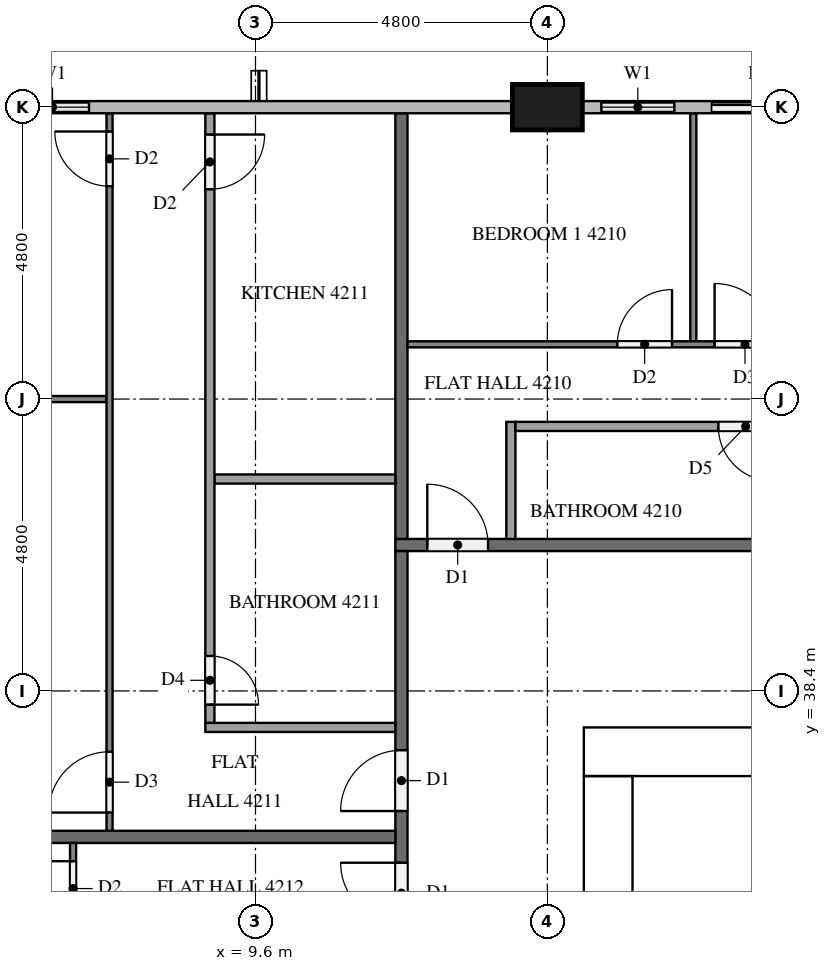
"""IFC4 building model, lengths in metres.
Left out: names, types, materials, properties, quantities, classifications, styles, units other than length and angle.
Written with IfcOpenShell. Run it as: python <this file> out.ifc"""

import sys

from ifc_helpers import new_model, si_unit, direction, frame, frame_2d, origin, origin_2d, place, context, subcontext, project, spatial, rectangle, extrude, element, fill, save


model = new_model("IFC4")
c1 = context("Model", 3, precision=1e-05, world=origin(), true_north=direction((0.0, 1.0)))
c2 = subcontext(c1, "Body", "Model", "MODEL_VIEW")
j1 = project(units=[si_unit("LENGTHUNIT", "METRE"), si_unit("PLANEANGLEUNIT", "RADIAN")], contexts=[c1])
p1 = place(None, origin())
s1 = spatial("IfcSite", under=j1, at=p1, CompositionType="ELEMENT")
p2 = place(p1, origin())
s2 = spatial("IfcBuilding", under=s1, at=p2, CompositionType="ELEMENT")
p3 = place(p2, frame((0.0, 0.0, 163.0)))
s3 = spatial("IfcBuildingStorey", under=s2, at=p3, CompositionType="ELEMENT", Elevation=163.0)
p4 = place(p3, frame((15.0, 37.4, 0.0), z_axis=(0.0, 0.0, 1.0), x_axis=(1.0, 0.0, 0.0)))
e1 = element("IfcWall", 1, at=p4, inside=s3, PredefinedType="SHEAR", context=c2, shape_type="SweptSolid", body=[
    extrude(rectangle(XDim=32.4, YDim=0.8, at=frame_2d((16.2, 0.0))), origin(), (0.0, 0.0, 1.0), 3.2),
])
p5 = place(p4, frame((15.3, 0.0, 0.0)))
e2 = element("IfcOpeningElement", 2, at=p5, cuts=e1, PredefinedType="OPENING", context=c2, shape_type="SweptSolid", body=[
    extrude(rectangle(XDim=1.8, YDim=2.1, at=frame_2d((0.9, 1.05))), frame((0.0, 0.41, 0.0), z_axis=(0.0, -1.0, 0.0), x_axis=(1.0, 0.0, 0.0)), (0.0, 0.0, 1.0), 0.82),
])
p6 = place(p4, frame((1.51, 0.0, 0.0)))
e3 = element("IfcOpeningElement", 3, at=p6, cuts=e1, PredefinedType="OPENING", context=c2, shape_type="SweptSolid", body=[
    extrude(rectangle(XDim=1.0, YDim=2.1, at=frame_2d((0.5, 1.05))), frame((0.0, 0.41, 0.0), z_axis=(0.0, -1.0, 0.0), x_axis=(1.0, 0.0, 0.0)), (0.0, 0.0, 1.0), 0.82),
])
p7 = place(p4, frame((5.11, 0.0, 0.0)))
e4 = element("IfcOpeningElement", 4, at=p7, cuts=e1, PredefinedType="OPENING", context=c2, shape_type="SweptSolid", body=[
    extrude(rectangle(XDim=1.0, YDim=2.1, at=frame_2d((0.5, 1.05))), frame((0.0, 0.41, 0.0), z_axis=(0.0, -1.0, 0.0), x_axis=(1.0, 0.0, 0.0)), (0.0, 0.0, 1.0), 0.82),
])
p8 = place(p3, frame((15.4, 15.8, 0.0), z_axis=(0.0, 0.0, 1.0), x_axis=(0.0, 1.0, 0.0)))
e5 = element("IfcWall", 5, at=p8, inside=s3, PredefinedType="SHEAR", context=c2, shape_type="SweptSolid", body=[
    extrude(rectangle(XDim=21.2, YDim=0.8, at=frame_2d((10.6, 0.0))), origin(), (0.0, 0.0, 1.0), 3.2),
])
p9 = place(p8, frame((4.96, 0.0, 0.0)))
e6 = element("IfcOpeningElement", 6, at=p9, cuts=e5, PredefinedType="OPENING", context=c2, shape_type="SweptSolid", body=[
    extrude(rectangle(XDim=1.2, YDim=2.1, at=frame_2d((0.6, 1.05))), frame((0.0, 0.41, 0.0), z_axis=(0.0, -1.0, 0.0), x_axis=(1.0, 0.0, 0.0)), (0.0, 0.0, 1.0), 0.82),
])
p10 = place(p3, frame((14.4, 48.0, 0.0), z_axis=(0.0, 0.0, 1.0), x_axis=(1.0, 0.0, 0.0)))
e7 = element("IfcColumn", 7, at=p10, inside=s3, PredefinedType="COLUMN", context=c2, shape_type="SweptSolid", body=[
    extrude(rectangle(XDim=1.15, YDim=0.75, at=origin_2d()), origin(), (0.0, 0.0, 1.0), 3.2),
])
p11 = place(p3, frame((19.2, 48.0, 0.0), z_axis=(0.0, 0.0, 1.0), x_axis=(-1.0, 0.0, 0.0)))
e8 = element("IfcWall", 8, at=p11, inside=s3, PredefinedType="SOLIDWALL", context=c2, shape_type="SweptSolid", body=[
    extrude(rectangle(XDim=4.225, YDim=0.15, at=frame_2d((2.112, 0.0))), origin(), (0.0, 0.0, 1.0), 3.2),
])
p12 = place(p11, frame((0.3, 0.0, 0.0)))
e9 = element("IfcOpeningElement", 9, at=p12, cuts=e8, PredefinedType="OPENING", context=c2, shape_type="SweptSolid", body=[
    extrude(rectangle(XDim=1.8, YDim=2.4, at=frame_2d((0.9, 1.2))), frame((0.0, 0.085, 0.0), z_axis=(0.0, -1.0, 0.0), x_axis=(1.0, 0.0, 0.0)), (0.0, 0.0, 1.0), 0.17),
])
p13 = place(p11, frame((2.712, 0.0, 0.9)))
e10 = element("IfcOpeningElement", 10, at=p13, cuts=e8, PredefinedType="OPENING", context=c2, shape_type="SweptSolid", body=[
    extrude(rectangle(XDim=1.2, YDim=1.4, at=frame_2d((0.6, 0.7))), frame((0.0, 0.085, 0.0), z_axis=(0.0, -1.0, 0.0), x_axis=(1.0, 0.0, 0.0)), (0.0, 0.0, 1.0), 0.17),
])
p14 = place(p3, frame((7.2, 48.0, 0.0), z_axis=(0.0, 0.0, 1.0), x_axis=(-1.0, 0.0, 0.0)))
e11 = element("IfcWall", 11, at=p14, inside=s3, PredefinedType="SOLIDWALL", context=c2, shape_type="SweptSolid", body=[
    extrude(rectangle(XDim=1.875, YDim=0.15, at=frame_2d((0.938, 0.0))), origin(), (0.0, 0.0, 1.0), 3.2),
])
p15 = place(p14, frame((0.337, 0.0, 0.9)))
e12 = element("IfcOpeningElement", 12, at=p15, cuts=e11, PredefinedType="OPENING", context=c2, shape_type="SweptSolid", body=[
    extrude(rectangle(XDim=1.2, YDim=1.4, at=frame_2d((0.6, 0.7))), frame((0.0, 0.085, 0.0), z_axis=(0.0, -1.0, 0.0), x_axis=(1.0, 0.0, 0.0)), (0.0, 0.0, 1.0), 0.17),
])
p16 = place(p3, frame((11.9, 40.8, 0.0), z_axis=(0.0, 0.0, 1.0), x_axis=(1.0, 0.0, 0.0)))
e13 = element("IfcWall", 13, at=p16, inside=s3, PredefinedType="PARTITIONING", context=c2, shape_type="SweptSolid", body=[
    extrude(rectangle(XDim=38.6, YDim=0.2, at=frame_2d((19.3, 0.0))), origin(), (0.0, 0.0, 1.0), 3.2),
])
p17 = place(p16, frame((31.725, 0.0, 0.0)))
e14 = element("IfcOpeningElement", 14, at=p17, cuts=e13, PredefinedType="OPENING", context=c2, shape_type="SweptSolid", body=[
    extrude(rectangle(XDim=1.0, YDim=2.1, at=frame_2d((0.5, 1.05))), frame((0.0, 0.11, 0.0), z_axis=(0.0, -1.0, 0.0), x_axis=(1.0, 0.0, 0.0)), (0.0, 0.0, 1.0), 0.22),
])
p18 = place(p16, frame((17.325, 0.0, 0.0)))
e15 = element("IfcOpeningElement", 15, at=p18, cuts=e13, PredefinedType="OPENING", context=c2, shape_type="SweptSolid", body=[
    extrude(rectangle(XDim=1.0, YDim=2.1, at=frame_2d((0.5, 1.05))), frame((0.0, 0.11, 0.0), z_axis=(0.0, -1.0, 0.0), x_axis=(1.0, 0.0, 0.0)), (0.0, 0.0, 1.0), 0.22),
])
p19 = place(p16, frame((0.525, 0.0, 0.0)))
e16 = element("IfcOpeningElement", 16, at=p19, cuts=e13, PredefinedType="OPENING", context=c2, shape_type="SweptSolid", body=[
    extrude(rectangle(XDim=1.0, YDim=2.1, at=frame_2d((0.5, 1.05))), frame((0.0, 0.11, 0.0), z_axis=(0.0, -1.0, 0.0), x_axis=(1.0, 0.0, 0.0)), (0.0, 0.0, 1.0), 0.22),
])
p20 = place(p3, frame((12.0, 12.1, 0.0), z_axis=(0.0, 0.0, 1.0), x_axis=(0.0, 1.0, 0.0)))
e17 = element("IfcWall", 17, at=p20, inside=s3, PredefinedType="PARTITIONING", context=c2, shape_type="SweptSolid", body=[
    extrude(rectangle(XDim=28.6, YDim=0.2, at=frame_2d((14.3, 0.0))), origin(), (0.0, 0.0, 1.0), 3.2),
])
p21 = place(p20, frame((24.325, 0.0, 0.0)))
e18 = element("IfcOpeningElement", 18, at=p21, cuts=e17, PredefinedType="OPENING", context=c2, shape_type="SweptSolid", body=[
    extrude(rectangle(XDim=1.0, YDim=2.1, at=frame_2d((0.5, 1.05))), frame((0.0, 0.11, 0.0), z_axis=(0.0, -1.0, 0.0), x_axis=(1.0, 0.0, 0.0)), (0.0, 0.0, 1.0), 0.22),
])
p22 = place(p20, frame((22.475, 0.0, 0.0)))
e19 = element("IfcOpeningElement", 19, at=p22, cuts=e17, PredefinedType="OPENING", context=c2, shape_type="SweptSolid", body=[
    extrude(rectangle(XDim=1.0, YDim=2.1, at=frame_2d((0.5, 1.05))), frame((0.0, 0.11, 0.0), z_axis=(0.0, -1.0, 0.0), x_axis=(1.0, 0.0, 0.0)), (0.0, 0.0, 1.0), 0.22),
])
p23 = place(p20, frame((0.325, 0.0, 0.0)))
e20 = element("IfcOpeningElement", 20, at=p23, cuts=e17, PredefinedType="OPENING", context=c2, shape_type="SweptSolid", body=[
    extrude(rectangle(XDim=1.0, YDim=2.1, at=frame_2d((0.5, 1.05))), frame((0.0, 0.11, 0.0), z_axis=(0.0, -1.0, 0.0), x_axis=(1.0, 0.0, 0.0)), (0.0, 0.0, 1.0), 0.22),
])
p24 = place(p3, frame((12.0, 47.9, 0.0), z_axis=(0.0, 0.0, 1.0), x_axis=(0.0, -1.0, 0.0)))
e21 = element("IfcWall", 21, at=p24, inside=s3, PredefinedType="PARTITIONING", context=c2, shape_type="SweptSolid", body=[
    extrude(rectangle(XDim=7.0, YDim=0.2, at=frame_2d((3.5, 0.0))), origin(), (0.0, 0.0, 1.0), 3.2),
])
p25 = place(p3, frame((0.1, 36.0, 0.0), z_axis=(0.0, 0.0, 1.0), x_axis=(1.0, 0.0, 0.0)))
e22 = element("IfcWall", 22, at=p25, inside=s3, PredefinedType="PARTITIONING", context=c2, shape_type="SweptSolid", body=[
    extrude(rectangle(XDim=11.8, YDim=0.2, at=frame_2d((5.9, 0.0))), origin(), (0.0, 0.0, 1.0), 3.2),
])
p26 = place(p3, frame((16.8, 44.15, 0.0), z_axis=(0.0, 0.0, 1.0), x_axis=(0.0, 1.0, 0.0)))
e23 = element("IfcWall", 23, at=p26, inside=s3, PredefinedType="PARTITIONING", context=c2, shape_type="SweptSolid", body=[
    extrude(rectangle(XDim=3.75, YDim=0.1, at=frame_2d((1.875, 0.0))), origin(), (0.0, 0.0, 1.0), 3.2),
])
p27 = place(p3, frame((12.1, 44.1, 0.0), z_axis=(0.0, 0.0, 1.0), x_axis=(1.0, 0.0, 0.0)))
e24 = element("IfcWall", 24, at=p27, inside=s3, PredefinedType="PARTITIONING", context=c2, shape_type="SweptSolid", body=[
    extrude(rectangle(XDim=16.6, YDim=0.1, at=frame_2d((8.3, 0.0))), origin(), (0.0, 0.0, 1.0), 3.2),
])
p28 = place(p27, frame((3.45, 0.0, 0.0)))
e25 = element("IfcOpeningElement", 25, at=p28, cuts=e24, PredefinedType="OPENING", context=c2, shape_type="SweptSolid", body=[
    extrude(rectangle(XDim=0.9, YDim=2.1, at=frame_2d((0.45, 1.05))), frame((0.0, 0.06, 0.0), z_axis=(0.0, -1.0, 0.0), x_axis=(1.0, 0.0, 0.0)), (0.0, 0.0, 1.0), 0.12),
])
p29 = place(p27, frame((5.05, 0.0, 0.0)))
e26 = element("IfcOpeningElement", 26, at=p29, cuts=e24, PredefinedType="OPENING", context=c2, shape_type="SweptSolid", body=[
    extrude(rectangle(XDim=1.0, YDim=2.1, at=frame_2d((0.5, 1.05))), frame((0.0, 0.06, 0.0), z_axis=(0.0, -1.0, 0.0), x_axis=(1.0, 0.0, 0.0)), (0.0, 0.0, 1.0), 0.12),
])
p30 = place(p27, frame((15.4, 0.0, 0.0)))
e27 = element("IfcOpeningElement", 27, at=p30, cuts=e24, PredefinedType="OPENING", context=c2, shape_type="SweptSolid", body=[
    extrude(rectangle(XDim=0.9, YDim=2.1, at=frame_2d((0.45, 1.05))), frame((0.0, 0.06, 0.0), z_axis=(0.0, -1.0, 0.0), x_axis=(1.0, 0.0, 0.0)), (0.0, 0.0, 1.0), 0.12),
])
p31 = place(p3, frame((13.8, 40.9, 0.0), z_axis=(0.0, 0.0, 1.0), x_axis=(0.0, 1.0, 0.0)))
e28 = element("IfcWall", 28, at=p31, inside=s3, PredefinedType="PARTITIONING", context=c2, shape_type="SweptSolid", body=[
    extrude(rectangle(XDim=1.925, YDim=0.15, at=frame_2d((0.962, 0.0))), origin(), (0.0, 0.0, 1.0), 3.2),
])
p32 = place(p3, frame((28.7, 42.75, 0.0), z_axis=(0.0, 0.0, 1.0), x_axis=(-1.0, 0.0, 0.0)))
e29 = element("IfcWall", 29, at=p32, inside=s3, PredefinedType="PARTITIONING", context=c2, shape_type="SweptSolid", body=[
    extrude(rectangle(XDim=14.825, YDim=0.15, at=frame_2d((7.413, 0.0))), origin(), (0.0, 0.0, 1.0), 3.2),
])
p33 = place(p32, frame((10.588, 0.0, 0.0)))
e30 = element("IfcOpeningElement", 30, at=p33, cuts=e29, PredefinedType="OPENING", context=c2, shape_type="SweptSolid", body=[
    extrude(rectangle(XDim=0.9, YDim=2.1, at=frame_2d((0.45, 1.05))), frame((0.0, 0.085, 0.0), z_axis=(0.0, -1.0, 0.0), x_axis=(1.0, 0.0, 0.0)), (0.0, 0.0, 1.0), 0.17),
])
p34 = place(p32, frame((9.138, 0.0, 0.0)))
e31 = element("IfcOpeningElement", 31, at=p34, cuts=e29, PredefinedType="OPENING", context=c2, shape_type="SweptSolid", body=[
    extrude(rectangle(XDim=0.8, YDim=2.1, at=frame_2d((0.4, 1.05))), frame((0.0, 0.085, 0.0), z_axis=(0.0, -1.0, 0.0), x_axis=(1.0, 0.0, 0.0)), (0.0, 0.0, 1.0), 0.17),
])
p35 = place(p32, frame((0.35, 0.0, 0.0)))
e32 = element("IfcOpeningElement", 32, at=p35, cuts=e29, PredefinedType="OPENING", context=c2, shape_type="SweptSolid", body=[
    extrude(rectangle(XDim=0.9, YDim=2.1, at=frame_2d((0.45, 1.05))), frame((0.0, 0.085, 0.0), z_axis=(0.0, -1.0, 0.0), x_axis=(1.0, 0.0, 0.0)), (0.0, 0.0, 1.0), 0.17),
])
p36 = place(p3, frame((7.15, 43.2, 0.0), z_axis=(0.0, 0.0, 1.0), x_axis=(-1.0, 0.0, 0.0)))
e33 = element("IfcWall", 33, at=p36, inside=s3, PredefinedType="PARTITIONING", context=c2, shape_type="SweptSolid", body=[
    extrude(rectangle(XDim=6.625, YDim=0.1, at=frame_2d((3.312, 0.0))), origin(), (0.0, 0.0, 1.0), 3.2),
])
p37 = place(p3, frame((7.2, 36.1, 0.0), z_axis=(0.0, 0.0, 1.0), x_axis=(0.0, 1.0, 0.0)))
e34 = element("IfcWall", 34, at=p37, inside=s3, PredefinedType="PARTITIONING", context=c2, shape_type="SweptSolid", body=[
    extrude(rectangle(XDim=11.8, YDim=0.1, at=frame_2d((5.9, 0.0))), origin(), (0.0, 0.0, 1.0), 3.2),
])
p38 = place(p37, frame((0.3, 0.0, 0.0)))
e35 = element("IfcOpeningElement", 35, at=p38, cuts=e34, PredefinedType="OPENING", context=c2, shape_type="SweptSolid", body=[
    extrude(rectangle(XDim=1.0, YDim=2.1, at=frame_2d((0.5, 1.05))), frame((0.0, 0.06, 0.0), z_axis=(0.0, -1.0, 0.0), x_axis=(1.0, 0.0, 0.0)), (0.0, 0.0, 1.0), 0.12),
])
p39 = place(p37, frame((10.6, 0.0, 0.0)))
e36 = element("IfcOpeningElement", 36, at=p39, cuts=e34, PredefinedType="OPENING", context=c2, shape_type="SweptSolid", body=[
    extrude(rectangle(XDim=0.9, YDim=2.1, at=frame_2d((0.45, 1.05))), frame((0.0, 0.06, 0.0), z_axis=(0.0, -1.0, 0.0), x_axis=(1.0, 0.0, 0.0)), (0.0, 0.0, 1.0), 0.12),
])
p40 = place(p3, frame((11.9, 41.885, 0.0), z_axis=(0.0, 0.0, 1.0), x_axis=(-1.0, 0.0, 0.0)))
e37 = element("IfcWall", 37, at=p40, inside=s3, PredefinedType="PARTITIONING", context=c2, shape_type="SweptSolid", body=[
    extrude(rectangle(XDim=2.975, YDim=0.15, at=frame_2d((1.487, 0.0))), origin(), (0.0, 0.0, 1.0), 3.2),
])
p41 = place(p3, frame((11.9, 37.8, 0.0), z_axis=(0.0, 0.0, 1.0), x_axis=(-1.0, 0.0, 0.0)))
e38 = element("IfcWall", 38, at=p41, inside=s3, PredefinedType="PARTITIONING", context=c2, shape_type="SweptSolid", body=[
    extrude(rectangle(XDim=3.125, YDim=0.15, at=frame_2d((1.562, 0.0))), origin(), (0.0, 0.0, 1.0), 3.2),
])
p42 = place(p3, frame((8.85, 47.9, 0.0), z_axis=(0.0, 0.0, 1.0), x_axis=(0.0, -1.0, 0.0)))
e39 = element("IfcWall", 39, at=p42, inside=s3, PredefinedType="PARTITIONING", context=c2, shape_type="SweptSolid", body=[
    extrude(rectangle(XDim=10.025, YDim=0.15, at=frame_2d((5.012, 0.0))), origin(), (0.0, 0.0, 1.0), 3.2),
])
p43 = place(p42, frame((8.925, 0.0, 0.0)))
e40 = element("IfcOpeningElement", 40, at=p43, cuts=e39, PredefinedType="OPENING", context=c2, shape_type="SweptSolid", body=[
    extrude(rectangle(XDim=0.8, YDim=2.1, at=frame_2d((0.4, 1.05))), frame((0.0, 0.085, 0.0), z_axis=(0.0, -1.0, 0.0), x_axis=(1.0, 0.0, 0.0)), (0.0, 0.0, 1.0), 0.17),
])
p44 = place(p42, frame((0.35, 0.0, 0.0)))
e41 = element("IfcOpeningElement", 41, at=p44, cuts=e39, PredefinedType="OPENING", context=c2, shape_type="SweptSolid", body=[
    extrude(rectangle(XDim=0.9, YDim=2.1, at=frame_2d((0.45, 1.05))), frame((0.0, 0.085, 0.0), z_axis=(0.0, -1.0, 0.0), x_axis=(1.0, 0.0, 0.0)), (0.0, 0.0, 1.0), 0.17),
])
p45 = place(p3, frame((6.6, 26.5, 0.0), z_axis=(0.0, 0.0, 1.0), x_axis=(0.0, 1.0, 0.0)))
e42 = element("IfcWall", 42, at=p45, inside=s3, PredefinedType="PARTITIONING", context=c2, shape_type="SweptSolid", body=[
    extrude(rectangle(XDim=9.4, YDim=0.1, at=frame_2d((4.7, 0.0))), origin(), (0.0, 0.0, 1.0), 3.2),
])
p46 = place(p45, frame((8.2, 0.0, 0.0)))
e43 = element("IfcOpeningElement", 43, at=p46, cuts=e42, PredefinedType="OPENING", context=c2, shape_type="SweptSolid", body=[
    extrude(rectangle(XDim=0.9, YDim=2.1, at=frame_2d((0.45, 1.05))), frame((0.0, 0.06, 0.0), z_axis=(0.0, -1.0, 0.0), x_axis=(1.0, 0.0, 0.0)), (0.0, 0.0, 1.0), 0.12),
])
p47 = place(p45, frame((0.3, 0.0, 0.0)))
e44 = element("IfcOpeningElement", 44, at=p47, cuts=e42, PredefinedType="OPENING", context=c2, shape_type="SweptSolid", body=[
    extrude(rectangle(XDim=1.0, YDim=2.1, at=frame_2d((0.5, 1.05))), frame((0.0, 0.06, 0.0), z_axis=(0.0, -1.0, 0.0), x_axis=(1.0, 0.0, 0.0)), (0.0, 0.0, 1.0), 0.12),
])
p48 = place(p12, origin())
e45 = element("IfcDoor", 45, at=p48, inside=s3, OperationType="SLIDING_TO_RIGHT", PredefinedType="DOOR", context=c2, shape_type="SweptSolid", body=[
    extrude(rectangle(XDim=1.8, YDim=2.4, at=frame_2d((0.9, 1.2))), frame((0.0, 0.025, 0.0), z_axis=(0.0, -1.0, 0.0), x_axis=(1.0, 0.0, 0.0)), (0.0, 0.0, 1.0), 0.05),
])
fill(e9, e45)
p49 = place(p13, origin())
e46 = element("IfcWindow", 46, at=p49, inside=s3, PartitioningType="SINGLE_PANEL", PredefinedType="WINDOW", context=c2, shape_type="SweptSolid", body=[
    extrude(rectangle(XDim=1.2, YDim=1.4, at=frame_2d((0.6, 0.7))), frame((0.0, 0.03, 0.0), z_axis=(0.0, -1.0, 0.0), x_axis=(1.0, 0.0, 0.0)), (0.0, 0.0, 1.0), 0.06),
])
fill(e10, e46)
p50 = place(p15, origin())
e47 = element("IfcWindow", 47, at=p50, inside=s3, PartitioningType="SINGLE_PANEL", PredefinedType="WINDOW", context=c2, shape_type="SweptSolid", body=[
    extrude(rectangle(XDim=1.2, YDim=1.4, at=frame_2d((0.6, 0.7))), frame((0.0, 0.03, 0.0), z_axis=(0.0, -1.0, 0.0), x_axis=(1.0, 0.0, 0.0)), (0.0, 0.0, 1.0), 0.06),
])
fill(e12, e47)
p51 = place(p6, origin())
e48 = element("IfcDoor", 48, at=p51, inside=s3, OperationType="SINGLE_SWING_LEFT", PredefinedType="DOOR", context=c2, shape_type="SweptSolid", body=[
    extrude(rectangle(XDim=1.0, YDim=2.1, at=frame_2d((0.5, 1.05))), frame((0.0, 0.025, 0.0), z_axis=(0.0, -1.0, 0.0), x_axis=(1.0, 0.0, 0.0)), (0.0, 0.0, 1.0), 0.05),
])
fill(e3, e48)
p52 = place(p19, origin())
e49 = element("IfcDoor", 49, at=p52, inside=s3, OperationType="SINGLE_SWING_LEFT", PredefinedType="DOOR", context=c2, shape_type="SweptSolid", body=[
    extrude(rectangle(XDim=1.0, YDim=2.1, at=frame_2d((0.5, 1.05))), frame((0.0, 0.025, 0.0), z_axis=(0.0, -1.0, 0.0), x_axis=(1.0, 0.0, 0.0)), (0.0, 0.0, 1.0), 0.05),
])
fill(e16, e49)
p53 = place(p21, origin())
e50 = element("IfcDoor", 50, at=p53, inside=s3, OperationType="SINGLE_SWING_LEFT", PredefinedType="DOOR", context=c2, shape_type="SweptSolid", body=[
    extrude(rectangle(XDim=1.0, YDim=2.1, at=frame_2d((0.5, 1.05))), frame((0.0, 0.025, 0.0), z_axis=(0.0, -1.0, 0.0), x_axis=(1.0, 0.0, 0.0)), (0.0, 0.0, 1.0), 0.05),
])
fill(e18, e50)
p54 = place(p22, origin())
e51 = element("IfcDoor", 51, at=p54, inside=s3, OperationType="SINGLE_SWING_RIGHT", PredefinedType="DOOR", context=c2, shape_type="SweptSolid", body=[
    extrude(rectangle(XDim=1.0, YDim=2.1, at=frame_2d((0.5, 1.05))), frame((0.0, 0.025, 0.0), z_axis=(0.0, -1.0, 0.0), x_axis=(1.0, 0.0, 0.0)), (0.0, 0.0, 1.0), 0.05),
])
fill(e19, e51)
p55 = place(p28, origin())
e52 = element("IfcDoor", 52, at=p55, inside=s3, OperationType="SINGLE_SWING_RIGHT", PredefinedType="DOOR", context=c2, shape_type="SweptSolid", body=[
    extrude(rectangle(XDim=0.9, YDim=2.1, at=frame_2d((0.45, 1.05))), frame((0.0, 0.025, 0.0), z_axis=(0.0, -1.0, 0.0), x_axis=(1.0, 0.0, 0.0)), (0.0, 0.0, 1.0), 0.05),
])
fill(e25, e52)
p56 = place(p29, origin())
e53 = element("IfcDoor", 53, at=p56, inside=s3, OperationType="SINGLE_SWING_LEFT", PredefinedType="DOOR", context=c2, shape_type="SweptSolid", body=[
    extrude(rectangle(XDim=1.0, YDim=2.1, at=frame_2d((0.5, 1.05))), frame((0.0, 0.025, 0.0), z_axis=(0.0, -1.0, 0.0), x_axis=(1.0, 0.0, 0.0)), (0.0, 0.0, 1.0), 0.05),
])
fill(e26, e53)
p57 = place(p33, origin())
e54 = element("IfcDoor", 54, at=p57, inside=s3, OperationType="SINGLE_SWING_LEFT", PredefinedType="DOOR", context=c2, shape_type="SweptSolid", body=[
    extrude(rectangle(XDim=0.9, YDim=2.1, at=frame_2d((0.45, 1.05))), frame((0.0, 0.025, 0.0), z_axis=(0.0, -1.0, 0.0), x_axis=(1.0, 0.0, 0.0)), (0.0, 0.0, 1.0), 0.05),
])
fill(e30, e54)
p58 = place(p38, origin())
e55 = element("IfcDoor", 55, at=p58, inside=s3, OperationType="SINGLE_SWING_LEFT", PredefinedType="DOOR", context=c2, shape_type="SweptSolid", body=[
    extrude(rectangle(XDim=1.0, YDim=2.1, at=frame_2d((0.5, 1.05))), frame((0.0, 0.025, 0.0), z_axis=(0.0, -1.0, 0.0), x_axis=(1.0, 0.0, 0.0)), (0.0, 0.0, 1.0), 0.05),
])
fill(e35, e55)
p59 = place(p39, origin())
e56 = element("IfcDoor", 56, at=p59, inside=s3, OperationType="SINGLE_SWING_RIGHT", PredefinedType="DOOR", context=c2, shape_type="SweptSolid", body=[
    extrude(rectangle(XDim=0.9, YDim=2.1, at=frame_2d((0.45, 1.05))), frame((0.0, 0.025, 0.0), z_axis=(0.0, -1.0, 0.0), x_axis=(1.0, 0.0, 0.0)), (0.0, 0.0, 1.0), 0.05),
])
fill(e36, e56)
p60 = place(p43, origin())
e57 = element("IfcDoor", 57, at=p60, inside=s3, OperationType="SINGLE_SWING_RIGHT", PredefinedType="DOOR", context=c2, shape_type="SweptSolid", body=[
    extrude(rectangle(XDim=0.8, YDim=2.1, at=frame_2d((0.4, 1.05))), frame((0.0, 0.025, 0.0), z_axis=(0.0, -1.0, 0.0), x_axis=(1.0, 0.0, 0.0)), (0.0, 0.0, 1.0), 0.05),
])
fill(e40, e57)
p61 = place(p44, origin())
e58 = element("IfcDoor", 58, at=p61, inside=s3, OperationType="SINGLE_SWING_LEFT", PredefinedType="DOOR", context=c2, shape_type="SweptSolid", body=[
    extrude(rectangle(XDim=0.9, YDim=2.1, at=frame_2d((0.45, 1.05))), frame((0.0, 0.025, 0.0), z_axis=(0.0, -1.0, 0.0), x_axis=(1.0, 0.0, 0.0)), (0.0, 0.0, 1.0), 0.05),
])
fill(e41, e58)
p62 = place(p46, origin())
e59 = element("IfcDoor", 59, at=p62, inside=s3, OperationType="SINGLE_SWING_RIGHT", PredefinedType="DOOR", context=c2, shape_type="SweptSolid", body=[
    extrude(rectangle(XDim=0.9, YDim=2.1, at=frame_2d((0.45, 1.05))), frame((0.0, 0.025, 0.0), z_axis=(0.0, -1.0, 0.0), x_axis=(1.0, 0.0, 0.0)), (0.0, 0.0, 1.0), 0.05),
])
fill(e43, e59)
save(model, sys.argv[1])
